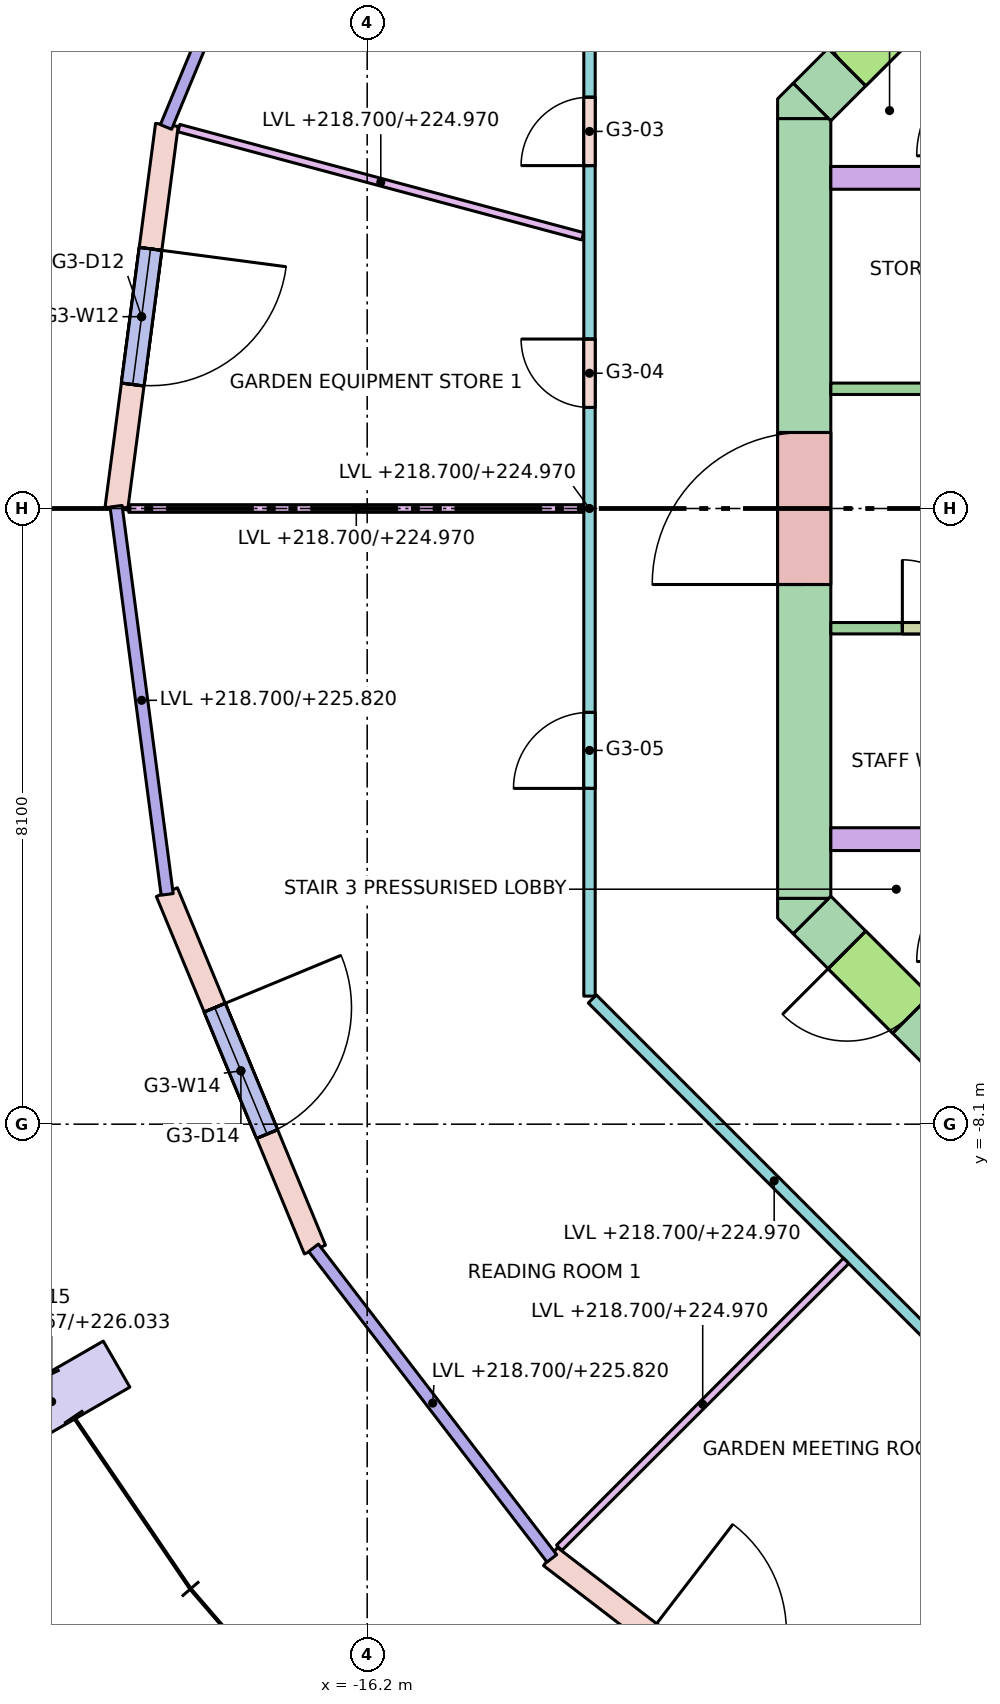
"""IFC4 building model, lengths in metres.
Left out: names, types, materials, properties, quantities, classifications, styles, units other than length and angle.
Written with IfcOpenShell. Run it as: python <this file> out.ifc"""

import sys

from ifc_helpers import new_model, si_unit, direction, frame, frame_2d, origin, origin_2d, place, context, subcontext, project, spatial, polyline, rectangle, outline, extrude, element, fill, save


model = new_model("IFC4")
c1 = context("Model", 3, precision=1e-05, world=origin(), true_north=direction((0.0, 1.0)))
c2 = subcontext(c1, "Body", "Model", "MODEL_VIEW")
j1 = project(units=[si_unit("LENGTHUNIT", "METRE"), si_unit("PLANEANGLEUNIT", "RADIAN")], contexts=[c1])
p1 = place(None, origin())
s1 = spatial("IfcSite", under=j1, at=p1, CompositionType="ELEMENT")
p2 = place(p1, origin())
s2 = spatial("IfcBuilding", under=s1, at=p2, CompositionType="ELEMENT")
p3 = place(p2, frame((0.0, 0.0, 218.7)))
s3 = spatial("IfcBuildingStorey", under=s2, at=p3, CompositionType="ELEMENT", Elevation=218.7)
p4 = place(p3, frame((-19.927, -11.505, 0.067), z_axis=(-0.115974555477, -0.066927607381, 0.990994751677), x_axis=(0.499830087764, -0.866123480438, 0.0)))
e1 = element("IfcColumn", 1, at=p4, inside=s3, PredefinedType="COLUMN", context=c2, shape_type="SweptSolid", body=[
    extrude(rectangle(XDim=0.7, YDim=1.0, at=origin_2d()), origin(), (0.0, 0.0, 1.0), 7.332),
])
p5 = place(p3, frame((-10.45, -5.13, -0.28), z_axis=(0.0, 0.0, 1.0), x_axis=(0.0, 1.0, 0.0)))
e2 = element("IfcWall", 2, at=p5, inside=s3, PredefinedType="SHEAR", context=c2, shape_type="SweptSolid", body=[
    extrude(rectangle(XDim=10.26, YDim=0.7, at=frame_2d((5.13, 0.0))), origin(), (0.0, 0.0, 1.0), 7.4),
])
p6 = place(p5, frame((4.13, 0.0, 0.28)))
e3 = element("IfcOpeningElement", 3, at=p6, cuts=e2, PredefinedType="OPENING", context=c2, shape_type="SweptSolid", body=[
    extrude(rectangle(XDim=2.0, YDim=2.1, at=frame_2d((1.0, 1.05))), frame((0.0, 0.36, 0.0), z_axis=(0.0, -1.0, 0.0), x_axis=(1.0, 0.0, 0.0)), (0.0, 0.0, 1.0), 0.72),
])
p7 = place(p3, frame((-10.347, 5.347, -0.28), z_axis=(0.0, 0.0, 1.0), x_axis=(0.707106781187, 0.707106781187, 0.0)))
e4 = element("IfcWall", 4, at=p7, inside=s3, PredefinedType="SHEAR", context=c2, shape_type="SweptSolid", body=[
    extrude(rectangle(XDim=4.243, YDim=0.7, at=frame_2d((2.121, 0.0))), origin(), (0.0, 0.0, 1.0), 7.4),
])
p8 = place(p7, frame((0.65, 0.0, 0.28)))
e5 = element("IfcOpeningElement", 5, at=p8, cuts=e4, PredefinedType="OPENING", context=c2, shape_type="SweptSolid", body=[
    extrude(rectangle(XDim=1.2, YDim=2.1, at=frame_2d((0.6, 1.05))), frame((0.0, 0.36, 0.0), z_axis=(0.0, -1.0, 0.0), x_axis=(1.0, 0.0, 0.0)), (0.0, 0.0, 1.0), 0.72),
])
p9 = place(p3, frame((-7.347, -8.347, -0.28), z_axis=(0.0, 0.0, 1.0), x_axis=(-0.707106781187, 0.707106781187, 0.0)))
e6 = element("IfcWall", 6, at=p9, inside=s3, PredefinedType="SHEAR", context=c2, shape_type="SweptSolid", body=[
    extrude(rectangle(XDim=4.243, YDim=0.7, at=frame_2d((2.121, 0.0))), origin(), (0.0, 0.0, 1.0), 7.4),
])
p10 = place(p9, frame((2.393, 0.0, 0.28)))
e7 = element("IfcOpeningElement", 7, at=p10, cuts=e6, PredefinedType="OPENING", context=c2, shape_type="SweptSolid", body=[
    extrude(rectangle(XDim=1.2, YDim=2.1, at=frame_2d((0.6, 1.05))), frame((0.0, 0.36, 0.0), z_axis=(0.0, -1.0, 0.0), x_axis=(1.0, 0.0, 0.0)), (0.0, 0.0, 1.0), 0.72),
])
p11 = place(p3, frame((0.0, 0.0, -0.28)))
e8 = element("IfcWall", 8, at=p11, inside=s3, PredefinedType="SHEAR", context=c2, shape_type="SweptSolid", body=[
    extrude(outline(polyline([(-10.8, -5.39), (-10.8, -5.13), (-10.8, -5.13), (-10.13, -5.13), (-10.595, -5.595), (-10.595, -5.595), (-10.595, -5.595), (-10.8, -5.39)])), origin(), (0.0, 0.0, 1.0), 7.4),
])
p12 = place(p3, frame((0.0, 0.0, -0.28)))
e9 = element("IfcWall", 9, at=p12, inside=s3, PredefinedType="SHEAR", context=c2, shape_type="SweptSolid", body=[
    extrude(outline(polyline([(-10.595, 5.595), (-10.595, 5.595), (-10.595, 5.595), (-10.13, 5.13), (-10.8, 5.13), (-10.8, 5.13), (-10.8, 5.39), (-10.595, 5.595)])), origin(), (0.0, 0.0, 1.0), 7.4),
])
for number, where, z_axis, x_axis in (
    (10, (-10.1, 4.35, 0.0), (0.0, 0.0, 1.0), (1.0, 0.0, 0.0)),
    (11, (-10.1, -4.35, 0.0), (0.0, 0.0, 1.0), (1.0, 0.0, 0.0)),
):
    element("IfcWall", number, at=place(p3, frame(where, z_axis=z_axis, x_axis=x_axis)), inside=s3, PredefinedType="SOLIDWALL", context=c2, shape_type="SweptSolid", body=[
        extrude(rectangle(XDim=8.1, YDim=0.3, at=frame_2d((4.05, 0.0))), origin(), (0.0, 0.0, 1.0), 7.12),
    ])
p13 = place(p3, frame((-18.836, 5.047, 0.0), z_axis=(0.0, 0.0, 1.0), x_axis=(-0.130495451964, -0.99144890792, 0.0)))
e12 = element("IfcWall", 12, at=p13, inside=s3, PredefinedType="STANDARD", context=c2, shape_type="SweptSolid", body=[
    extrude(rectangle(XDim=5.091, YDim=0.3, at=frame_2d((2.545, 0.0))), origin(), (0.0, 0.0, 1.0), 7.12),
])
p14 = place(p13, frame((1.645, 0.0, 0.0)))
e13 = element("IfcOpeningElement", 13, at=p14, cuts=e12, PredefinedType="OPENING", context=c2, shape_type="SweptSolid", body=[
    extrude(rectangle(XDim=1.8, YDim=2.4, at=frame_2d((0.9, 1.2))), frame((0.0, 0.16, 0.0), z_axis=(0.0, -1.0, 0.0), x_axis=(1.0, 0.0, 0.0)), (0.0, 0.0, 1.0), 0.32),
])
p15 = place(p13, frame((1.645, 0.0, 2.8)))
e14 = element("IfcOpeningElement", 14, at=p15, cuts=e12, PredefinedType="OPENING", context=c2, shape_type="SweptSolid", body=[
    extrude(rectangle(XDim=1.8, YDim=4.1, at=frame_2d((0.9, 2.05))), frame((0.0, 0.16, 0.0), z_axis=(0.0, -1.0, 0.0), x_axis=(1.0, 0.0, 0.0)), (0.0, 0.0, 1.0), 0.32),
])
p16 = place(p3, frame((-18.836, -5.047, 0.0), z_axis=(0.0, 0.0, 1.0), x_axis=(0.382724538613, -0.923862504675, 0.0)))
e15 = element("IfcWall", 15, at=p16, inside=s3, PredefinedType="STANDARD", context=c2, shape_type="SweptSolid", body=[
    extrude(rectangle(XDim=5.091, YDim=0.3, at=frame_2d((2.545, 0.0))), origin(), (0.0, 0.0, 1.0), 7.12),
])
p17 = place(p16, frame((1.645, 0.0, 0.0)))
e16 = element("IfcOpeningElement", 16, at=p17, cuts=e15, PredefinedType="OPENING", context=c2, shape_type="SweptSolid", body=[
    extrude(rectangle(XDim=1.8, YDim=2.4, at=frame_2d((0.9, 1.2))), frame((0.0, 0.16, 0.0), z_axis=(0.0, -1.0, 0.0), x_axis=(1.0, 0.0, 0.0)), (0.0, 0.0, 1.0), 0.32),
])
p18 = place(p16, frame((1.645, 0.0, 2.8)))
e17 = element("IfcOpeningElement", 17, at=p18, cuts=e15, PredefinedType="OPENING", context=c2, shape_type="SweptSolid", body=[
    extrude(rectangle(XDim=1.8, YDim=4.1, at=frame_2d((0.9, 2.05))), frame((0.0, 0.16, 0.0), z_axis=(0.0, -1.0, 0.0), x_axis=(1.0, 0.0, 0.0)), (0.0, 0.0, 1.0), 0.32),
])
p19 = place(p3, frame((-13.789, -13.789, 0.0), z_axis=(0.0, 0.0, 1.0), x_axis=(0.79335619014, -0.608757714995, 0.0)))
e18 = element("IfcWall", 18, at=p19, inside=s3, PredefinedType="STANDARD", context=c2, shape_type="SweptSolid", body=[
    extrude(rectangle(XDim=5.091, YDim=0.3, at=frame_2d((2.545, 0.0))), origin(), (0.0, 0.0, 1.0), 7.12),
])
p20 = place(p19, frame((1.645, 0.0, 0.0)))
e19 = element("IfcOpeningElement", 19, at=p20, cuts=e18, PredefinedType="OPENING", context=c2, shape_type="SweptSolid", body=[
    extrude(rectangle(XDim=1.8, YDim=2.4, at=frame_2d((0.9, 1.2))), frame((0.0, 0.16, 0.0), z_axis=(0.0, -1.0, 0.0), x_axis=(1.0, 0.0, 0.0)), (0.0, 0.0, 1.0), 0.32),
])
p21 = place(p19, frame((1.645, 0.0, 2.8)))
e20 = element("IfcOpeningElement", 20, at=p21, cuts=e18, PredefinedType="OPENING", context=c2, shape_type="SweptSolid", body=[
    extrude(rectangle(XDim=1.8, YDim=4.1, at=frame_2d((0.9, 2.05))), frame((0.0, 0.16, 0.0), z_axis=(0.0, -1.0, 0.0), x_axis=(1.0, 0.0, 0.0)), (0.0, 0.0, 1.0), 0.32),
])
p22 = place(p3, frame((-10.1, 1.575, 0.0), z_axis=(0.0, 0.0, 1.0), x_axis=(1.0, 0.0, 0.0)))
e21 = element("IfcWall", 21, at=p22, inside=s3, PredefinedType="PARTITIONING", context=c2, shape_type="SweptSolid", body=[
    extrude(rectangle(XDim=8.1, YDim=0.15, at=frame_2d((4.05, 0.0))), origin(), (0.0, 0.0, 1.0), 7.12),
])
p23 = place(p22, frame((2.333, 0.0, 0.0)))
e22 = element("IfcOpeningElement", 22, at=p23, cuts=e21, PredefinedType="OPENING", context=c2, shape_type="SweptSolid", body=[
    extrude(rectangle(XDim=0.9, YDim=2.1, at=frame_2d((0.45, 1.05))), frame((0.0, 0.085, 0.0), z_axis=(0.0, -1.0, 0.0), x_axis=(1.0, 0.0, 0.0)), (0.0, 0.0, 1.0), 0.17),
])
p24 = place(p22, frame((6.35, 0.0, 0.0)))
e23 = element("IfcOpeningElement", 23, at=p24, cuts=e21, PredefinedType="OPENING", context=c2, shape_type="SweptSolid", body=[
    extrude(rectangle(XDim=0.9, YDim=2.1, at=frame_2d((0.45, 1.05))), frame((0.0, 0.085, 0.0), z_axis=(0.0, -1.0, 0.0), x_axis=(1.0, 0.0, 0.0)), (0.0, 0.0, 1.0), 0.17),
])
p25 = place(p3, frame((-10.1, -1.575, 0.0), z_axis=(0.0, 0.0, 1.0), x_axis=(1.0, 0.0, 0.0)))
e24 = element("IfcWall", 24, at=p25, inside=s3, PredefinedType="PARTITIONING", context=c2, shape_type="SweptSolid", body=[
    extrude(rectangle(XDim=8.1, YDim=0.15, at=frame_2d((4.05, 0.0))), origin(), (0.0, 0.0, 1.0), 7.12),
])
p26 = place(p25, frame((0.941, 0.0, 0.0)))
e25 = element("IfcOpeningElement", 25, at=p26, cuts=e24, PredefinedType="OPENING", context=c2, shape_type="SweptSolid", body=[
    extrude(rectangle(XDim=0.9, YDim=2.1, at=frame_2d((0.45, 1.05))), frame((0.0, 0.085, 0.0), z_axis=(0.0, -1.0, 0.0), x_axis=(1.0, 0.0, 0.0)), (0.0, 0.0, 1.0), 0.17),
])
p27 = place(p25, frame((5.066, 0.0, 0.0)))
e26 = element("IfcOpeningElement", 26, at=p27, cuts=e24, PredefinedType="OPENING", context=c2, shape_type="SweptSolid", body=[
    extrude(rectangle(XDim=0.9, YDim=2.1, at=frame_2d((0.45, 1.05))), frame((0.0, 0.085, 0.0), z_axis=(0.0, -1.0, 0.0), x_axis=(1.0, 0.0, 0.0)), (0.0, 0.0, 1.0), 0.17),
])
p28 = place(p3, frame((-8.452, -11.238, 0.0), z_axis=(0.0, 0.0, 1.0), x_axis=(-0.707106781187, 0.707106781187, 0.0)))
e27 = element("IfcWall", 27, at=p28, inside=s3, PredefinedType="PARTITIONING", context=c2, shape_type="SweptSolid", body=[
    extrude(rectangle(XDim=6.768, YDim=0.15, at=frame_2d((3.384, 0.0))), origin(), (0.0, 0.0, 1.0), 6.27),
])
p29 = place(p3, frame((-13.275, -6.415, 0.0), z_axis=(0.0, 0.0, 1.0), x_axis=(0.0, 1.0, 0.0)))
e28 = element("IfcWall", 28, at=p29, inside=s3, PredefinedType="PARTITIONING", context=c2, shape_type="SweptSolid", body=[
    extrude(rectangle(XDim=12.83, YDim=0.15, at=frame_2d((6.415, 0.0))), origin(), (0.0, 0.0, 1.0), 6.27),
])
p30 = place(p29, frame((10.926, 0.0, 0.0)))
e29 = element("IfcOpeningElement", 29, at=p30, cuts=e28, PredefinedType="OPENING", context=c2, shape_type="SweptSolid", body=[
    extrude(rectangle(XDim=0.9, YDim=2.1, at=frame_2d((0.45, 1.05))), frame((0.0, 0.085, 0.0), z_axis=(0.0, -1.0, 0.0), x_axis=(1.0, 0.0, 0.0)), (0.0, 0.0, 1.0), 0.17),
])
p31 = place(p29, frame((7.744, 0.0, 0.0)))
e30 = element("IfcOpeningElement", 30, at=p31, cuts=e28, PredefinedType="OPENING", context=c2, shape_type="SweptSolid", body=[
    extrude(rectangle(XDim=0.9, YDim=2.1, at=frame_2d((0.45, 1.05))), frame((0.0, 0.085, 0.0), z_axis=(0.0, -1.0, 0.0), x_axis=(1.0, 0.0, 0.0)), (0.0, 0.0, 1.0), 0.17),
])
p32 = place(p29, frame((2.733, 0.0, 0.0)))
e31 = element("IfcOpeningElement", 31, at=p32, cuts=e28, PredefinedType="OPENING", context=c2, shape_type="SweptSolid", body=[
    extrude(rectangle(XDim=1.0, YDim=2.1, at=frame_2d((0.5, 1.05))), frame((0.0, 0.085, 0.0), z_axis=(0.0, -1.0, 0.0), x_axis=(1.0, 0.0, 0.0)), (0.0, 0.0, 1.0), 0.17),
])
p33 = place(p3, frame((-13.364, 3.581, 0.0), z_axis=(0.0, 0.0, 1.0), x_axis=(-0.965932996121, 0.258792285443, 0.0)))
e32 = element("IfcWall", 32, at=p33, inside=s3, PredefinedType="PARTITIONING", context=c2, shape_type="SweptSolid", body=[
    extrude(rectangle(XDim=5.501, YDim=0.1, at=frame_2d((2.75, 0.0))), origin(), (0.0, 0.0, 1.0), 6.27),
])
p34 = place(p3, frame((-13.35, 0.0, 0.0), z_axis=(0.0, 0.0, 1.0), x_axis=(-1.0, 0.0, 0.0)))
e33 = element("IfcWall", 33, at=p34, inside=s3, PredefinedType="PARTITIONING", context=c2, shape_type="SweptSolid", body=[
    extrude(rectangle(XDim=5.987, YDim=0.1, at=frame_2d((2.993, 0.0))), origin(), (0.0, 0.0, 1.0), 6.27),
])
p35 = place(p3, frame((-9.898, -9.898, 0.0), z_axis=(0.0, 0.0, 1.0), x_axis=(-0.707106781187, -0.707106781187, 0.0)))
e34 = element("IfcWall", 34, at=p35, inside=s3, PredefinedType="PARTITIONING", context=c2, shape_type="SweptSolid", body=[
    extrude(rectangle(XDim=5.339, YDim=0.1, at=frame_2d((2.669, 0.0))), origin(), (0.0, 0.0, 1.0), 6.27),
])
p36 = place(p14, origin())
e35 = element("IfcDoor", 35, at=p36, inside=s3, OperationType="SINGLE_SWING_LEFT", PredefinedType="DOOR", context=c2, shape_type="SweptSolid", body=[
    extrude(rectangle(XDim=1.8, YDim=2.4, at=frame_2d((0.9, 1.2))), frame((0.0, 0.025, 0.0), z_axis=(0.0, -1.0, 0.0), x_axis=(1.0, 0.0, 0.0)), (0.0, 0.0, 1.0), 0.05),
])
fill(e13, e35)
p37 = place(p15, origin())
e36 = element("IfcWindow", 36, at=p37, inside=s3, PartitioningType="SINGLE_PANEL", PredefinedType="WINDOW", context=c2, shape_type="SweptSolid", body=[
    extrude(rectangle(XDim=1.8, YDim=4.1, at=frame_2d((0.9, 2.05))), frame((0.0, 0.03, 0.0), z_axis=(0.0, -1.0, 0.0), x_axis=(1.0, 0.0, 0.0)), (0.0, 0.0, 1.0), 0.06),
])
fill(e14, e36)
p38 = place(p17, origin())
e37 = element("IfcDoor", 37, at=p38, inside=s3, OperationType="SINGLE_SWING_LEFT", PredefinedType="DOOR", context=c2, shape_type="SweptSolid", body=[
    extrude(rectangle(XDim=1.8, YDim=2.4, at=frame_2d((0.9, 1.2))), frame((0.0, 0.025, 0.0), z_axis=(0.0, -1.0, 0.0), x_axis=(1.0, 0.0, 0.0)), (0.0, 0.0, 1.0), 0.05),
])
fill(e16, e37)
p39 = place(p18, origin())
e38 = element("IfcWindow", 38, at=p39, inside=s3, PartitioningType="SINGLE_PANEL", PredefinedType="WINDOW", context=c2, shape_type="SweptSolid", body=[
    extrude(rectangle(XDim=1.8, YDim=4.1, at=frame_2d((0.9, 2.05))), frame((0.0, 0.03, 0.0), z_axis=(0.0, -1.0, 0.0), x_axis=(1.0, 0.0, 0.0)), (0.0, 0.0, 1.0), 0.06),
])
fill(e17, e38)
p40 = place(p8, origin())
e39 = element("IfcDoor", 39, at=p40, inside=s3, OperationType="SINGLE_SWING_RIGHT", PredefinedType="DOOR", context=c2, shape_type="SweptSolid", body=[
    extrude(rectangle(XDim=1.2, YDim=2.1, at=frame_2d((0.6, 1.05))), frame((0.0, 0.025, 0.0), z_axis=(0.0, -1.0, 0.0), x_axis=(1.0, 0.0, 0.0)), (0.0, 0.0, 1.0), 0.05),
])
fill(e5, e39)
p41 = place(p10, origin())
e40 = element("IfcDoor", 40, at=p41, inside=s3, OperationType="SINGLE_SWING_RIGHT", PredefinedType="DOOR", context=c2, shape_type="SweptSolid", body=[
    extrude(rectangle(XDim=1.2, YDim=2.1, at=frame_2d((0.6, 1.05))), frame((0.0, 0.025, 0.0), z_axis=(0.0, -1.0, 0.0), x_axis=(1.0, 0.0, 0.0)), (0.0, 0.0, 1.0), 0.05),
])
fill(e7, e40)
p42 = place(p6, origin())
e41 = element("IfcDoor", 41, at=p42, inside=s3, OperationType="DOUBLE_DOOR_SINGLE_SWING", PredefinedType="DOOR", context=c2, shape_type="SweptSolid", body=[
    extrude(rectangle(XDim=2.0, YDim=2.1, at=frame_2d((1.0, 1.05))), frame((0.0, 0.025, 0.0), z_axis=(0.0, -1.0, 0.0), x_axis=(1.0, 0.0, 0.0)), (0.0, 0.0, 1.0), 0.05),
])
fill(e3, e41)
p43 = place(p26, origin())
e42 = element("IfcDoor", 42, at=p43, inside=s3, OperationType="SINGLE_SWING_LEFT", PredefinedType="DOOR", context=c2, shape_type="SweptSolid", body=[
    extrude(rectangle(XDim=0.9, YDim=2.1, at=frame_2d((0.45, 1.05))), frame((0.0, 0.025, 0.0), z_axis=(0.0, -1.0, 0.0), x_axis=(1.0, 0.0, 0.0)), (0.0, 0.0, 1.0), 0.05),
])
fill(e25, e42)
p44 = place(p30, origin())
e43 = element("IfcDoor", 43, at=p44, inside=s3, OperationType="SINGLE_SWING_LEFT", PredefinedType="DOOR", context=c2, shape_type="SweptSolid", body=[
    extrude(rectangle(XDim=0.9, YDim=2.1, at=frame_2d((0.45, 1.05))), frame((0.0, 0.025, 0.0), z_axis=(0.0, -1.0, 0.0), x_axis=(1.0, 0.0, 0.0)), (0.0, 0.0, 1.0), 0.05),
])
fill(e29, e43)
p45 = place(p31, origin())
e44 = element("IfcDoor", 44, at=p45, inside=s3, OperationType="SINGLE_SWING_RIGHT", PredefinedType="DOOR", context=c2, shape_type="SweptSolid", body=[
    extrude(rectangle(XDim=0.9, YDim=2.1, at=frame_2d((0.45, 1.05))), frame((0.0, 0.025, 0.0), z_axis=(0.0, -1.0, 0.0), x_axis=(1.0, 0.0, 0.0)), (0.0, 0.0, 1.0), 0.05),
])
fill(e30, e44)
p46 = place(p32, origin())
e45 = element("IfcDoor", 45, at=p46, inside=s3, OperationType="SINGLE_SWING_LEFT", PredefinedType="DOOR", context=c2, shape_type="SweptSolid", body=[
    extrude(rectangle(XDim=1.0, YDim=2.1, at=frame_2d((0.5, 1.05))), frame((0.0, 0.025, 0.0), z_axis=(0.0, -1.0, 0.0), x_axis=(1.0, 0.0, 0.0)), (0.0, 0.0, 1.0), 0.05),
])
fill(e31, e45)
save(model, sys.argv[1])
